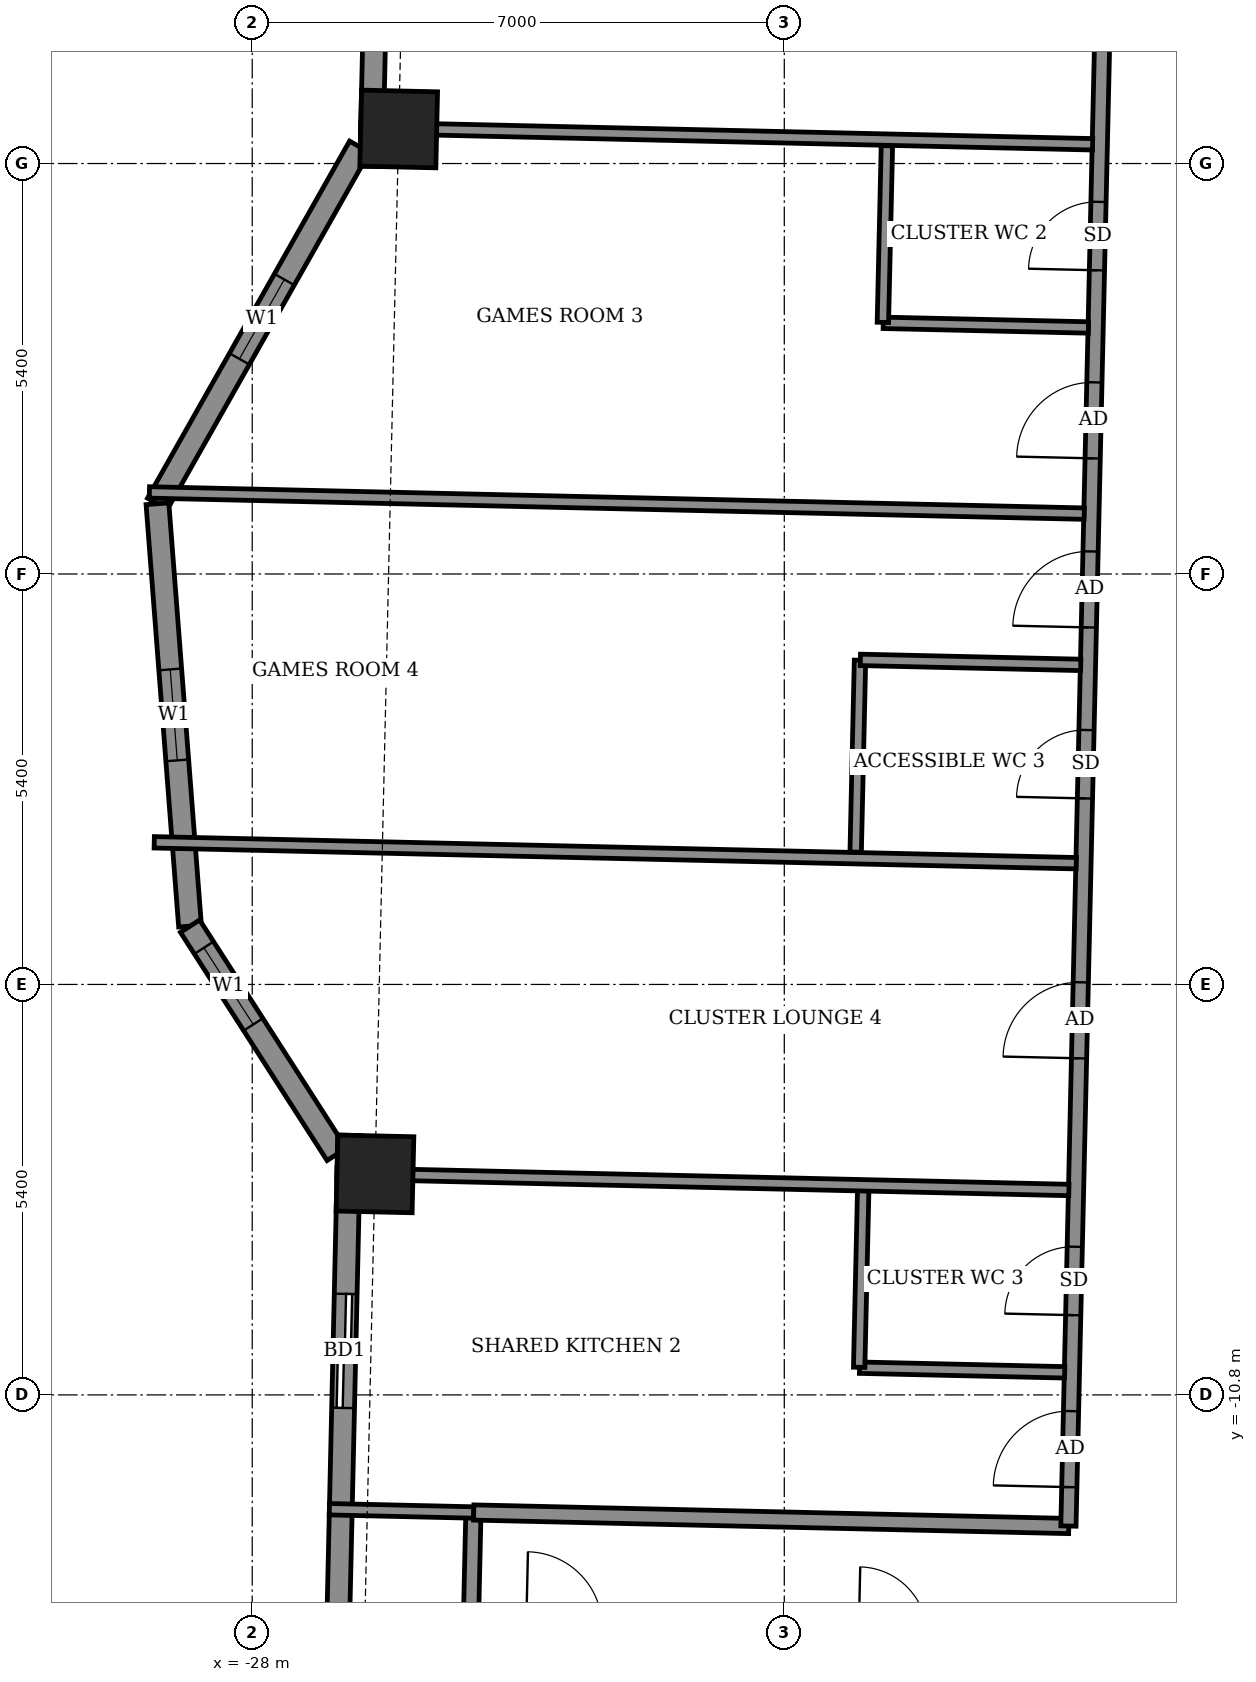
"""IFC4 building model, lengths in metres.
Left out: names, types, materials, properties, quantities, classifications, styles, units other than length and angle.
Written with IfcOpenShell. Run it as: python <this file> out.ifc"""

import sys

from ifc_helpers import new_model, si_unit, direction, frame, frame_2d, origin, origin_2d, place, context, subcontext, project, spatial, rectangle, extrude, element, fill, save


model = new_model("IFC4")
c1 = context("Model", 3, precision=1e-05, world=origin(), true_north=direction((0.0, 1.0)))
c2 = subcontext(c1, "Body", "Model", "MODEL_VIEW")
j1 = project(units=[si_unit("LENGTHUNIT", "METRE"), si_unit("PLANEANGLEUNIT", "RADIAN")], contexts=[c1])
p1 = place(None, origin())
s1 = spatial("IfcSite", under=j1, at=p1, CompositionType="ELEMENT")
p2 = place(p1, origin())
s2 = spatial("IfcBuilding", under=s1, at=p2, CompositionType="ELEMENT")
p3 = place(p2, frame((0.0, 0.0, 257.3)))
s3 = spatial("IfcBuildingStorey", under=s2, at=p3, CompositionType="ELEMENT", Elevation=257.3)
for number, where, z_axis, x_axis in (
    (1, (-26.385, -7.892, -0.55), (0.0, 0.0, 1.0), (-0.023, -1.0, 0.0)),
    (2, (-26.073, 5.855, -0.55), (0.0, 0.0, 1.0), (-0.023, -1.0, 0.0)),
):
    element("IfcColumn", number, at=place(p3, frame(where, z_axis=z_axis, x_axis=x_axis)), inside=s3, PredefinedType="COLUMN", context=c2, shape_type="SweptSolid", body=[
        extrude(rectangle(XDim=1.0, YDim=1.0, at=origin_2d()), origin(), (0.0, 0.0, 1.0), 3.6),
    ])
p4 = place(p3, frame((-26.113, 19.534, 0.0), z_axis=(0.0, 0.0, 1.0), x_axis=(-0.022649415303, -0.999743469089, 0.0)))
e3 = element("IfcWall", 3, at=p4, inside=s3, PredefinedType="SOLIDWALL", context=c2, shape_type="SweptSolid", body=[
    extrude(rectangle(XDim=14.175, YDim=0.3, at=frame_2d((7.087, 0.0))), origin(), (0.0, 0.0, 1.0), 2.55),
])
p5 = place(p4, frame((2.735, 0.0, 0.0)))
e4 = element("IfcOpeningElement", 4, at=p5, cuts=e3, PredefinedType="OPENING", context=c2, shape_type="SweptSolid", body=[
    extrude(rectangle(XDim=1.5, YDim=2.4, at=frame_2d((0.75, 1.2))), frame((0.0, 0.16, 0.0), z_axis=(0.0, -1.0, 0.0), x_axis=(1.0, 0.0, 0.0)), (0.0, 0.0, 1.0), 0.32),
])
p6 = place(p4, frame((9.019, 0.0, 0.9)))
e5 = element("IfcOpeningElement", 5, at=p6, cuts=e3, PredefinedType="OPENING", context=c2, shape_type="SweptSolid", body=[
    extrude(rectangle(XDim=2.4, YDim=1.5, at=frame_2d((1.2, 0.75))), frame((0.0, 0.16, 0.0), z_axis=(0.0, -1.0, 0.0), x_axis=(1.0, 0.0, 0.0)), (0.0, 0.0, 1.0), 0.32),
])
p7 = place(p3, frame((-26.589, 5.621, 0.0), z_axis=(0.0, 0.0, 1.0), x_axis=(-0.492495436053, -0.870315026566, 0.0)))
e6 = element("IfcWall", 6, at=p7, inside=s3, PredefinedType="SOLIDWALL", context=c2, shape_type="SweptSolid", body=[
    extrude(rectangle(XDim=5.397, YDim=0.3, at=frame_2d((2.698, 0.0))), origin(), (0.0, 0.0, 1.0), 3.05),
])
p8 = place(p7, frame((2.007, 0.0, 0.9)))
e7 = element("IfcOpeningElement", 7, at=p8, cuts=e6, PredefinedType="OPENING", context=c2, shape_type="SweptSolid", body=[
    extrude(rectangle(XDim=1.2, YDim=1.5, at=frame_2d((0.6, 0.75))), frame((0.0, 0.16, 0.0), z_axis=(0.0, -1.0, 0.0), x_axis=(1.0, 0.0, 0.0)), (0.0, 0.0, 1.0), 0.32),
])
p9 = place(p3, frame((-29.247, 0.924, 0.0), z_axis=(0.0, 0.0, 1.0), x_axis=(0.076961115238, -0.997034095075, 0.0)))
e8 = element("IfcWall", 8, at=p9, inside=s3, PredefinedType="SOLIDWALL", context=c2, shape_type="SweptSolid", body=[
    extrude(rectangle(XDim=5.574, YDim=0.3, at=frame_2d((2.787, 0.0))), origin(), (0.0, 0.0, 1.0), 3.05),
])
p10 = place(p9, frame((2.186, 0.0, 0.9)))
e9 = element("IfcOpeningElement", 9, at=p10, cuts=e8, PredefinedType="OPENING", context=c2, shape_type="SweptSolid", body=[
    extrude(rectangle(XDim=1.2, YDim=1.5, at=frame_2d((0.6, 0.75))), frame((0.0, 0.16, 0.0), z_axis=(0.0, -1.0, 0.0), x_axis=(1.0, 0.0, 0.0)), (0.0, 0.0, 1.0), 0.32),
])
p11 = place(p3, frame((-28.818, -4.633, 0.0), z_axis=(0.0, 0.0, 1.0), x_axis=(0.540633100578, -0.841258492117, 0.0)))
e10 = element("IfcWall", 10, at=p11, inside=s3, PredefinedType="SOLIDWALL", context=c2, shape_type="SweptSolid", body=[
    extrude(rectangle(XDim=3.568, YDim=0.3, at=frame_2d((1.784, 0.0))), origin(), (0.0, 0.0, 1.0), 3.05),
])
p12 = place(p11, frame((0.338, 0.0, 0.9)))
e11 = element("IfcOpeningElement", 11, at=p12, cuts=e10, PredefinedType="OPENING", context=c2, shape_type="SweptSolid", body=[
    extrude(rectangle(XDim=1.2, YDim=1.5, at=frame_2d((0.6, 0.75))), frame((0.0, 0.16, 0.0), z_axis=(0.0, -1.0, 0.0), x_axis=(1.0, 0.0, 0.0)), (0.0, 0.0, 1.0), 0.32),
])
p13 = place(p3, frame((-26.723, -7.385, 0.0), z_axis=(0.0, 0.0, 1.0), x_axis=(-0.022715697396, -0.999741965255, 0.0)))
e12 = element("IfcWall", 12, at=p13, inside=s3, PredefinedType="SOLIDWALL", context=c2, shape_type="SweptSolid", body=[
    extrude(rectangle(XDim=14.574, YDim=0.3, at=frame_2d((7.287, 0.0))), origin(), (0.0, 0.0, 1.0), 2.55),
])
p14 = place(p13, frame((2.087, 0.0, 0.0)))
e13 = element("IfcOpeningElement", 13, at=p14, cuts=e12, PredefinedType="OPENING", context=c2, shape_type="SweptSolid", body=[
    extrude(rectangle(XDim=1.5, YDim=2.4, at=frame_2d((0.75, 1.2))), frame((0.0, 0.16, 0.0), z_axis=(0.0, -1.0, 0.0), x_axis=(1.0, 0.0, 0.0)), (0.0, 0.0, 1.0), 0.32),
])
p15 = place(p13, frame((9.749, 0.0, 0.9)))
e14 = element("IfcOpeningElement", 14, at=p15, cuts=e12, PredefinedType="OPENING", context=c2, shape_type="SweptSolid", body=[
    extrude(rectangle(XDim=2.4, YDim=1.5, at=frame_2d((1.2, 0.75))), frame((0.0, 0.16, 0.0), z_axis=(0.0, -1.0, 0.0), x_axis=(1.0, 0.0, 0.0)), (0.0, 0.0, 1.0), 0.32),
])
p16 = place(p3, frame((-25.124, -13.847, 0.0), z_axis=(0.0, 0.0, 1.0), x_axis=(0.022617910375, 0.999744182344, 0.0)))
e15 = element("IfcWall", 15, at=p16, inside=s3, PredefinedType="PARTITIONING", context=c2, shape_type="SweptSolid", body=[
    extrude(rectangle(XDim=1.5, YDim=0.2, at=frame_2d((0.75, 0.0))), origin(), (0.0, 0.0, 1.0), 3.05),
])
p17 = place(p3, frame((-26.985, -12.304, 0.0), z_axis=(0.0, 0.0, 1.0), x_axis=(0.999744152544, -0.022619227516, 0.0)))
e16 = element("IfcWall", 16, at=p17, inside=s3, PredefinedType="PARTITIONING", context=c2, shape_type="SweptSolid", body=[
    extrude(rectangle(XDim=1.9, YDim=0.15, at=frame_2d((0.95, 0.0))), origin(), (0.0, 0.0, 1.0), 2.5),
])
p18 = place(p3, frame((-25.086, -12.347, 0.0), z_axis=(0.0, 0.0, 1.0), x_axis=(0.999741690667, -0.022727779103, 0.0)))
e17 = element("IfcWall", 17, at=p18, inside=s3, PredefinedType="PARTITIONING", context=c2, shape_type="SweptSolid", body=[
    extrude(rectangle(XDim=7.831, YDim=0.2, at=frame_2d((3.916, 0.0))), origin(), (0.0, 0.0, 1.0), 3.05),
])
p19 = place(p3, frame((-17.262, -12.525, 0.0), z_axis=(0.0, 0.0, 1.0), x_axis=(0.022706151961, 0.999742182097, 0.0)))
e18 = element("IfcWall", 18, at=p19, inside=s3, PredefinedType="PARTITIONING", context=c2, shape_type="SweptSolid", body=[
    extrude(rectangle(XDim=25.45, YDim=0.2, at=frame_2d((12.725, 0.0))), origin(), (0.0, 0.0, 1.0), 3.05),
])
p20 = place(p19, frame((19.913, 0.0, 0.0)))
e19 = element("IfcOpeningElement", 19, at=p20, cuts=e18, PredefinedType="OPENING", context=c2, shape_type="SweptSolid", body=[
    extrude(rectangle(XDim=1.0, YDim=2.1, at=frame_2d((0.5, 1.05))), frame((0.0, 0.11, 0.0), z_axis=(0.0, -1.0, 0.0), x_axis=(1.0, 0.0, 0.0)), (0.0, 0.0, 1.0), 0.22),
])
p21 = place(p19, frame((23.6, 0.0, 0.0)))
e20 = element("IfcOpeningElement", 20, at=p21, cuts=e18, PredefinedType="OPENING", context=c2, shape_type="SweptSolid", body=[
    extrude(rectangle(XDim=0.9, YDim=2.1, at=frame_2d((0.45, 1.05))), frame((0.0, 0.11, 0.0), z_axis=(0.0, -1.0, 0.0), x_axis=(1.0, 0.0, 0.0)), (0.0, 0.0, 1.0), 0.22),
])
p22 = place(p19, frame((14.05, 0.0, 0.0)))
e21 = element("IfcOpeningElement", 21, at=p22, cuts=e18, PredefinedType="OPENING", context=c2, shape_type="SweptSolid", body=[
    extrude(rectangle(XDim=1.0, YDim=2.1, at=frame_2d((0.5, 1.05))), frame((0.0, 0.11, 0.0), z_axis=(0.0, -1.0, 0.0), x_axis=(1.0, 0.0, 0.0)), (0.0, 0.0, 1.0), 0.22),
])
p23 = place(p19, frame((16.525, 0.0, 0.0)))
e22 = element("IfcOpeningElement", 22, at=p23, cuts=e18, PredefinedType="OPENING", context=c2, shape_type="SweptSolid", body=[
    extrude(rectangle(XDim=0.9, YDim=2.1, at=frame_2d((0.45, 1.05))), frame((0.0, 0.11, 0.0), z_axis=(0.0, -1.0, 0.0), x_axis=(1.0, 0.0, 0.0)), (0.0, 0.0, 1.0), 0.22),
])
p24 = place(p19, frame((11.825, 0.0, 0.0)))
e23 = element("IfcOpeningElement", 23, at=p24, cuts=e18, PredefinedType="OPENING", context=c2, shape_type="SweptSolid", body=[
    extrude(rectangle(XDim=1.0, YDim=2.1, at=frame_2d((0.5, 1.05))), frame((0.0, 0.11, 0.0), z_axis=(0.0, -1.0, 0.0), x_axis=(1.0, 0.0, 0.0)), (0.0, 0.0, 1.0), 0.22),
])
p25 = place(p19, frame((9.575, 0.0, 0.0)))
e24 = element("IfcOpeningElement", 24, at=p25, cuts=e18, PredefinedType="OPENING", context=c2, shape_type="SweptSolid", body=[
    extrude(rectangle(XDim=0.9, YDim=2.1, at=frame_2d((0.45, 1.05))), frame((0.0, 0.11, 0.0), z_axis=(0.0, -1.0, 0.0), x_axis=(1.0, 0.0, 0.0)), (0.0, 0.0, 1.0), 0.22),
])
p26 = place(p19, frame((6.155, 0.0, 0.0)))
e25 = element("IfcOpeningElement", 25, at=p26, cuts=e18, PredefinedType="OPENING", context=c2, shape_type="SweptSolid", body=[
    extrude(rectangle(XDim=1.0, YDim=2.1, at=frame_2d((0.5, 1.05))), frame((0.0, 0.11, 0.0), z_axis=(0.0, -1.0, 0.0), x_axis=(1.0, 0.0, 0.0)), (0.0, 0.0, 1.0), 0.22),
])
p27 = place(p19, frame((0.512, 0.0, 0.0)))
e26 = element("IfcOpeningElement", 26, at=p27, cuts=e18, PredefinedType="OPENING", context=c2, shape_type="SweptSolid", body=[
    extrude(rectangle(XDim=1.0, YDim=2.1, at=frame_2d((0.5, 1.05))), frame((0.0, 0.11, 0.0), z_axis=(0.0, -1.0, 0.0), x_axis=(1.0, 0.0, 0.0)), (0.0, 0.0, 1.0), 0.22),
])
p28 = place(p19, frame((2.775, 0.0, 0.0)))
e27 = element("IfcOpeningElement", 27, at=p28, cuts=e18, PredefinedType="OPENING", context=c2, shape_type="SweptSolid", body=[
    extrude(rectangle(XDim=0.9, YDim=2.1, at=frame_2d((0.45, 1.05))), frame((0.0, 0.11, 0.0), z_axis=(0.0, -1.0, 0.0), x_axis=(1.0, 0.0, 0.0)), (0.0, 0.0, 1.0), 0.22),
])
p29 = place(p3, frame((-20.01, -10.442, 0.0), z_axis=(0.0, 0.0, 1.0), x_axis=(0.999744396973, -0.02260842146, 0.0)))
e28 = element("IfcWall", 28, at=p29, inside=s3, PredefinedType="PARTITIONING", context=c2, shape_type="SweptSolid", body=[
    extrude(rectangle(XDim=2.7, YDim=0.15, at=frame_2d((1.35, 0.0))), origin(), (0.0, 0.0, 1.0), 3.05),
])
p30 = place(p3, frame((-20.015, -10.437, 0.0), z_axis=(0.0, 0.0, 1.0), x_axis=(0.022781023197, 0.999740478815, 0.0)))
e29 = element("IfcWall", 29, at=p30, inside=s3, PredefinedType="PARTITIONING", context=c2, shape_type="SweptSolid", body=[
    extrude(rectangle(XDim=2.325, YDim=0.15, at=frame_2d((1.163, 0.0))), origin(), (0.0, 0.0, 1.0), 3.05),
])
p31 = place(p3, frame((-26.885, -7.885, 0.0), z_axis=(0.0, 0.0, 1.0), x_axis=(0.999741468995, -0.022737527832, 0.0)))
e30 = element("IfcWall", 30, at=p31, inside=s3, PredefinedType="PARTITIONING", context=c2, shape_type="SweptSolid", body=[
    extrude(rectangle(XDim=9.631, YDim=0.15, at=frame_2d((4.816, 0.0))), origin(), (0.0, 0.0, 1.0), 3.05),
])
p32 = place(p3, frame((-29.289, -3.53, 0.0), z_axis=(0.0, 0.0, 1.0), x_axis=(0.999743298181, -0.02265695791, 0.0)))
e31 = element("IfcWall", 31, at=p32, inside=s3, PredefinedType="PARTITIONING", context=c2, shape_type="SweptSolid", body=[
    extrude(rectangle(XDim=12.133, YDim=0.15, at=frame_2d((6.067, 0.0))), origin(), (0.0, 0.0, 1.0), 2.05),
])
p33 = place(p3, frame((-20.061, -3.659, 0.0), z_axis=(0.0, 0.0, 1.0), x_axis=(0.022629142889, 0.99974392816, 0.0)))
e32 = element("IfcWall", 32, at=p33, inside=s3, PredefinedType="PARTITIONING", context=c2, shape_type="SweptSolid", body=[
    extrude(rectangle(XDim=2.525, YDim=0.15, at=frame_2d((1.262, 0.0))), origin(), (0.0, 0.0, 1.0), 3.05),
])
p34 = place(p3, frame((-19.999, -1.13, 0.0), z_axis=(0.0, 0.0, 1.0), x_axis=(0.999739657619, -0.022817032779, 0.0)))
e33 = element("IfcWall", 33, at=p34, inside=s3, PredefinedType="PARTITIONING", context=c2, shape_type="SweptSolid", body=[
    extrude(rectangle(XDim=2.9, YDim=0.15, at=frame_2d((1.45, 0.0))), origin(), (0.0, 0.0, 1.0), 3.05),
])
p35 = place(p3, frame((-29.353, 1.073, 0.0), z_axis=(0.0, 0.0, 1.0), x_axis=(0.999742705664, -0.02268308777, 0.0)))
e34 = element("IfcWall", 34, at=p35, inside=s3, PredefinedType="PARTITIONING", context=c2, shape_type="SweptSolid", body=[
    extrude(rectangle(XDim=12.302, YDim=0.15, at=frame_2d((6.151, 0.0))), origin(), (0.0, 0.0, 1.0), 2.05),
])
p36 = place(p3, frame((-19.698, 3.304, 0.0), z_axis=(0.0, 0.0, 1.0), x_axis=(0.999744396973, -0.02260842146, 0.0)))
e35 = element("IfcWall", 35, at=p36, inside=s3, PredefinedType="PARTITIONING", context=c2, shape_type="SweptSolid", body=[
    extrude(rectangle(XDim=2.7, YDim=0.15, at=frame_2d((1.35, 0.0))), origin(), (0.0, 0.0, 1.0), 3.05),
])
p37 = place(p3, frame((-19.703, 3.31, 0.0), z_axis=(0.0, 0.0, 1.0), x_axis=(0.02279059109, 0.999740260747, 0.0)))
e36 = element("IfcWall", 36, at=p37, inside=s3, PredefinedType="PARTITIONING", context=c2, shape_type="SweptSolid", body=[
    extrude(rectangle(XDim=2.324, YDim=0.15, at=frame_2d((1.162, 0.0))), origin(), (0.0, 0.0, 1.0), 3.05),
])
p38 = place(p3, frame((-26.573, 5.871, 0.0), z_axis=(0.0, 0.0, 1.0), x_axis=(0.999743768709, -0.022636186244, 0.0)))
e37 = element("IfcWall", 37, at=p38, inside=s3, PredefinedType="PARTITIONING", context=c2, shape_type="SweptSolid", body=[
    extrude(rectangle(XDim=9.631, YDim=0.15, at=frame_2d((4.816, 0.0))), origin(), (0.0, 0.0, 1.0), 3.05),
])
p39 = place(p8, origin())
e38 = element("IfcWindow", 38, at=p39, inside=s3, PartitioningType="SINGLE_PANEL", PredefinedType="WINDOW", context=c2, shape_type="SweptSolid", body=[
    extrude(rectangle(XDim=1.2, YDim=1.5, at=frame_2d((0.6, 0.75))), frame((0.0, 0.03, 0.0), z_axis=(0.0, -1.0, 0.0), x_axis=(1.0, 0.0, 0.0)), (0.0, 0.0, 1.0), 0.06),
])
fill(e7, e38)
p40 = place(p10, origin())
e39 = element("IfcWindow", 39, at=p40, inside=s3, PartitioningType="SINGLE_PANEL", PredefinedType="WINDOW", context=c2, shape_type="SweptSolid", body=[
    extrude(rectangle(XDim=1.2, YDim=1.5, at=frame_2d((0.6, 0.75))), frame((0.0, 0.03, 0.0), z_axis=(0.0, -1.0, 0.0), x_axis=(1.0, 0.0, 0.0)), (0.0, 0.0, 1.0), 0.06),
])
fill(e9, e39)
p41 = place(p12, origin())
e40 = element("IfcWindow", 40, at=p41, inside=s3, PartitioningType="SINGLE_PANEL", PredefinedType="WINDOW", context=c2, shape_type="SweptSolid", body=[
    extrude(rectangle(XDim=1.2, YDim=1.5, at=frame_2d((0.6, 0.75))), frame((0.0, 0.03, 0.0), z_axis=(0.0, -1.0, 0.0), x_axis=(1.0, 0.0, 0.0)), (0.0, 0.0, 1.0), 0.06),
])
fill(e11, e40)
p42 = place(p14, origin())
e41 = element("IfcDoor", 41, at=p42, inside=s3, OperationType="SLIDING_TO_LEFT", PredefinedType="DOOR", context=c2, shape_type="SweptSolid", body=[
    extrude(rectangle(XDim=1.5, YDim=2.4, at=frame_2d((0.75, 1.2))), frame((0.0, 0.025, 0.0), z_axis=(0.0, -1.0, 0.0), x_axis=(1.0, 0.0, 0.0)), (0.0, 0.0, 1.0), 0.05),
])
fill(e13, e41)
p43 = place(p22, origin())
e42 = element("IfcDoor", 42, at=p43, inside=s3, OperationType="SINGLE_SWING_RIGHT", PredefinedType="DOOR", context=c2, shape_type="SweptSolid", body=[
    extrude(rectangle(XDim=1.0, YDim=2.1, at=frame_2d((0.5, 1.05))), frame((0.0, 0.025, 0.0), z_axis=(0.0, -1.0, 0.0), x_axis=(1.0, 0.0, 0.0)), (0.0, 0.0, 1.0), 0.05),
])
fill(e21, e42)
p44 = place(p23, origin())
e43 = element("IfcDoor", 43, at=p44, inside=s3, OperationType="SINGLE_SWING_RIGHT", PredefinedType="DOOR", context=c2, shape_type="SweptSolid", body=[
    extrude(rectangle(XDim=0.9, YDim=2.1, at=frame_2d((0.45, 1.05))), frame((0.0, 0.025, 0.0), z_axis=(0.0, -1.0, 0.0), x_axis=(1.0, 0.0, 0.0)), (0.0, 0.0, 1.0), 0.05),
])
fill(e22, e43)
p45 = place(p24, origin())
e44 = element("IfcDoor", 44, at=p45, inside=s3, OperationType="SINGLE_SWING_LEFT", PredefinedType="DOOR", context=c2, shape_type="SweptSolid", body=[
    extrude(rectangle(XDim=1.0, YDim=2.1, at=frame_2d((0.5, 1.05))), frame((0.0, 0.025, 0.0), z_axis=(0.0, -1.0, 0.0), x_axis=(1.0, 0.0, 0.0)), (0.0, 0.0, 1.0), 0.05),
])
fill(e23, e44)
p46 = place(p25, origin())
e45 = element("IfcDoor", 45, at=p46, inside=s3, OperationType="SINGLE_SWING_LEFT", PredefinedType="DOOR", context=c2, shape_type="SweptSolid", body=[
    extrude(rectangle(XDim=0.9, YDim=2.1, at=frame_2d((0.45, 1.05))), frame((0.0, 0.025, 0.0), z_axis=(0.0, -1.0, 0.0), x_axis=(1.0, 0.0, 0.0)), (0.0, 0.0, 1.0), 0.05),
])
fill(e24, e45)
p47 = place(p26, origin())
e46 = element("IfcDoor", 46, at=p47, inside=s3, OperationType="SINGLE_SWING_RIGHT", PredefinedType="DOOR", context=c2, shape_type="SweptSolid", body=[
    extrude(rectangle(XDim=1.0, YDim=2.1, at=frame_2d((0.5, 1.05))), frame((0.0, 0.025, 0.0), z_axis=(0.0, -1.0, 0.0), x_axis=(1.0, 0.0, 0.0)), (0.0, 0.0, 1.0), 0.05),
])
fill(e25, e46)
p48 = place(p27, origin())
e47 = element("IfcDoor", 47, at=p48, inside=s3, OperationType="SINGLE_SWING_LEFT", PredefinedType="DOOR", context=c2, shape_type="SweptSolid", body=[
    extrude(rectangle(XDim=1.0, YDim=2.1, at=frame_2d((0.5, 1.05))), frame((0.0, 0.025, 0.0), z_axis=(0.0, -1.0, 0.0), x_axis=(1.0, 0.0, 0.0)), (0.0, 0.0, 1.0), 0.05),
])
fill(e26, e47)
p49 = place(p28, origin())
e48 = element("IfcDoor", 48, at=p49, inside=s3, OperationType="SINGLE_SWING_RIGHT", PredefinedType="DOOR", context=c2, shape_type="SweptSolid", body=[
    extrude(rectangle(XDim=0.9, YDim=2.1, at=frame_2d((0.45, 1.05))), frame((0.0, 0.025, 0.0), z_axis=(0.0, -1.0, 0.0), x_axis=(1.0, 0.0, 0.0)), (0.0, 0.0, 1.0), 0.05),
])
fill(e27, e48)
save(model, sys.argv[1])
